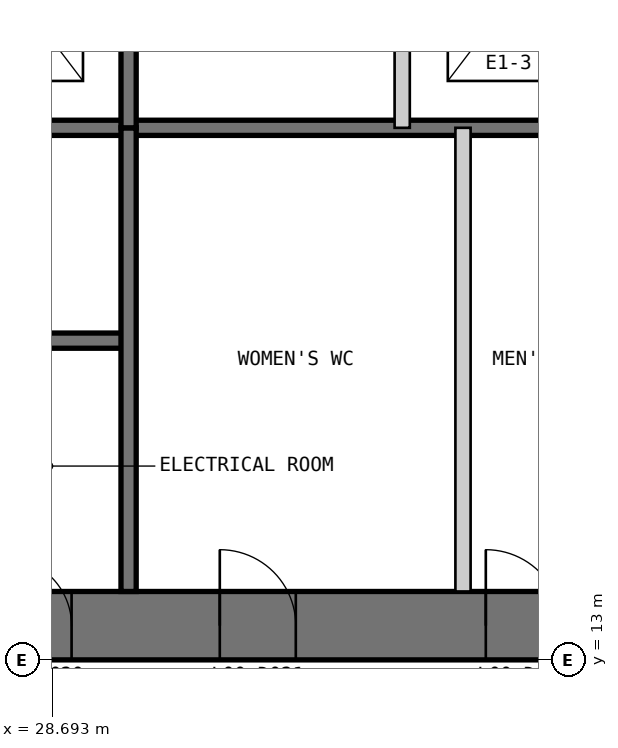
"""IFC4 building model, lengths in metres.
Left out: names, types, materials, properties, quantities, classifications, styles, units other than length and angle.
Written with IfcOpenShell. Run it as: python <this file> out.ifc"""

import sys

from ifc_helpers import new_model, si_unit, direction, frame, frame_2d, origin, place, context, subcontext, project, spatial, polyline, rectangle, outline, extrude, element, fill, save


model = new_model("IFC4")
c1 = context("Model", 3, precision=1e-05, world=origin(), true_north=direction((0.0, 1.0)))
c2 = subcontext(c1, "Body", "Model", "MODEL_VIEW")
j1 = project(units=[si_unit("LENGTHUNIT", "METRE"), si_unit("PLANEANGLEUNIT", "RADIAN")], contexts=[c1])
p1 = place(None, origin())
s1 = spatial("IfcSite", under=j1, at=p1, CompositionType="ELEMENT")
p2 = place(p1, origin())
s2 = spatial("IfcBuilding", under=s1, at=p2, CompositionType="ELEMENT")
p3 = place(p2, origin())
s3 = spatial("IfcBuildingStorey", under=s2, at=p3, CompositionType="ELEMENT", Elevation=0.0)
p4 = place(p3, frame((13.0, 13.45, 0.0), z_axis=(0.0, 0.0, 1.0), x_axis=(1.0, 0.0, 0.0)))
e1 = element("IfcWall", 1, at=p4, inside=s3, PredefinedType="SHEAR", context=c2, shape_type="SweptSolid", body=[
    extrude(outline(polyline([(0.0, -0.45), (24.0, -0.45), (23.1, 0.45), (0.9, 0.45), (0.0, -0.45)])), origin(), (0.0, 0.0, 1.0), 7.0),
])
p5 = place(p4, frame((4.9, 0.0, 0.0)))
e2 = element("IfcOpeningElement", 2, at=p5, cuts=e1, PredefinedType="OPENING", context=c2, shape_type="SweptSolid", body=[
    extrude(rectangle(XDim=1.0, YDim=2.2, at=frame_2d((0.5, 1.1))), frame((0.0, 0.46, 0.0), z_axis=(0.0, -1.0, 0.0), x_axis=(1.0, 0.0, 0.0)), (0.0, 0.0, 1.0), 0.92),
])
p6 = place(p4, frame((8.9, 0.0, 0.0)))
e3 = element("IfcOpeningElement", 3, at=p6, cuts=e1, PredefinedType="OPENING", context=c2, shape_type="SweptSolid", body=[
    extrude(rectangle(XDim=1.1, YDim=2.2, at=frame_2d((0.55, 1.1))), frame((0.0, 0.46, 0.0), z_axis=(0.0, -1.0, 0.0), x_axis=(1.0, 0.0, 0.0)), (0.0, 0.0, 1.0), 0.92),
])
p7 = place(p4, frame((15.05, 0.0, 0.0)))
e4 = element("IfcOpeningElement", 4, at=p7, cuts=e1, PredefinedType="OPENING", context=c2, shape_type="SweptSolid", body=[
    extrude(rectangle(XDim=0.9, YDim=2.2, at=frame_2d((0.45, 1.1))), frame((0.0, 0.46, 0.0), z_axis=(0.0, -1.0, 0.0), x_axis=(1.0, 0.0, 0.0)), (0.0, 0.0, 1.0), 0.92),
])
p8 = place(p4, frame((17.9, 0.0, 0.0)))
e5 = element("IfcOpeningElement", 5, at=p8, cuts=e1, PredefinedType="OPENING", context=c2, shape_type="SweptSolid", body=[
    extrude(rectangle(XDim=1.0, YDim=2.2, at=frame_2d((0.5, 1.1))), frame((0.0, 0.46, 0.0), z_axis=(0.0, -1.0, 0.0), x_axis=(1.0, 0.0, 0.0)), (0.0, 0.0, 1.0), 0.92),
])
p9 = place(p4, frame((21.4, 0.0, 0.0)))
e6 = element("IfcOpeningElement", 6, at=p9, cuts=e1, PredefinedType="OPENING", context=c2, shape_type="SweptSolid", body=[
    extrude(rectangle(XDim=1.0, YDim=2.2, at=frame_2d((0.5, 1.1))), frame((0.0, 0.46, 0.0), z_axis=(0.0, -1.0, 0.0), x_axis=(1.0, 0.0, 0.0)), (0.0, 0.0, 1.0), 0.92),
])
p10 = place(p3, frame((20.3, 17.2, 0.0), z_axis=(0.0, 0.0, 1.0), x_axis=(1.0, 0.0, 0.0)))
e7 = element("IfcWall", 7, at=p10, inside=s3, PredefinedType="SOLIDWALL", context=c2, shape_type="SweptSolid", body=[
    extrude(rectangle(XDim=9.4, YDim=0.2, at=frame_2d((4.7, 0.0))), origin(), (0.0, 0.0, 1.0), 6.8),
])
p11 = place(p10, frame((0.25, 0.0, 0.0)))
e8 = element("IfcOpeningElement", 8, at=p11, cuts=e7, PredefinedType="OPENING", context=c2, shape_type="SweptSolid", body=[
    extrude(rectangle(XDim=1.0, YDim=2.2, at=frame_2d((0.5, 1.1))), frame((0.0, 0.11, 0.0), z_axis=(0.0, -1.0, 0.0), x_axis=(1.0, 0.0, 0.0)), (0.0, 0.0, 1.0), 0.22),
])
p12 = place(p3, frame((20.3, 20.0, 0.0), z_axis=(0.0, 0.0, 1.0), x_axis=(1.0, 0.0, 0.0)))
e9 = element("IfcWall", 9, at=p12, inside=s3, PredefinedType="SOLIDWALL", context=c2, shape_type="SweptSolid", body=[
    extrude(rectangle(XDim=15.8, YDim=0.2, at=frame_2d((7.9, 0.0))), origin(), (0.0, 0.0, 1.0), 6.8),
])
p13 = place(p3, frame((29.7, 13.9, 0.0), z_axis=(0.0, 0.0, 1.0), x_axis=(0.0, 1.0, 0.0)))
e10 = element("IfcWall", 10, at=p13, inside=s3, PredefinedType="SOLIDWALL", context=c2, shape_type="SweptSolid", body=[
    extrude(rectangle(XDim=6.1, YDim=0.2, at=frame_2d((3.05, 0.0))), origin(), (0.0, 0.0, 1.0), 6.8),
])
p14 = place(p3, frame((34.1, 13.9, 0.0), z_axis=(0.0, 0.0, 1.0), x_axis=(0.0, 1.0, 0.0)))
e11 = element("IfcWall", 11, at=p14, inside=s3, PredefinedType="PARTITIONING", context=c2, shape_type="SweptSolid", body=[
    extrude(rectangle(XDim=6.1, YDim=0.2, at=frame_2d((3.05, 0.0))), origin(), (0.0, 0.0, 1.0), 6.8),
])
p15 = place(p3, frame((33.3, 36.1, 0.0), z_axis=(0.0, 0.0, 1.0), x_axis=(0.0, -1.0, 0.0)))
e12 = element("IfcWall", 12, at=p15, inside=s3, PredefinedType="PARTITIONING", context=c2, shape_type="SweptSolid", body=[
    extrude(rectangle(XDim=16.1, YDim=0.2, at=frame_2d((8.05, 0.0))), origin(), (0.0, 0.0, 1.0), 6.8),
])
p16 = place(p15, frame((4.4, 0.0, 0.0)))
e13 = element("IfcOpeningElement", 13, at=p16, cuts=e12, PredefinedType="OPENING", context=c2, shape_type="SweptSolid", body=[
    extrude(rectangle(XDim=0.9, YDim=2.2, at=frame_2d((0.45, 1.1))), frame((0.0, 0.11, 0.0), z_axis=(0.0, -1.0, 0.0), x_axis=(1.0, 0.0, 0.0)), (0.0, 0.0, 1.0), 0.22),
])
p17 = place(p15, frame((7.217, 0.0, 0.0)))
e14 = element("IfcOpeningElement", 14, at=p17, cuts=e12, PredefinedType="OPENING", context=c2, shape_type="SweptSolid", body=[
    extrude(rectangle(XDim=1.1, YDim=2.2, at=frame_2d((0.55, 1.1))), frame((0.0, 0.11, 0.0), z_axis=(0.0, -1.0, 0.0), x_axis=(1.0, 0.0, 0.0)), (0.0, 0.0, 1.0), 0.22),
])
p18 = place(p15, frame((10.55, 0.0, 0.0)))
e15 = element("IfcOpeningElement", 15, at=p18, cuts=e12, PredefinedType="OPENING", context=c2, shape_type="SweptSolid", body=[
    extrude(rectangle(XDim=1.1, YDim=2.2, at=frame_2d((0.55, 1.1))), frame((0.0, 0.11, 0.0), z_axis=(0.0, -1.0, 0.0), x_axis=(1.0, 0.0, 0.0)), (0.0, 0.0, 1.0), 0.22),
])
p19 = place(p15, frame((13.883, 0.0, 0.0)))
e16 = element("IfcOpeningElement", 16, at=p19, cuts=e12, PredefinedType="OPENING", context=c2, shape_type="SweptSolid", body=[
    extrude(rectangle(XDim=1.1, YDim=2.2, at=frame_2d((0.55, 1.1))), frame((0.0, 0.11, 0.0), z_axis=(0.0, -1.0, 0.0), x_axis=(1.0, 0.0, 0.0)), (0.0, 0.0, 1.0), 0.22),
])
p20 = place(p3, frame((29.7, 36.1, 0.0), z_axis=(0.0, 0.0, 1.0), x_axis=(0.0, -1.0, 0.0)))
e17 = element("IfcWall", 17, at=p20, inside=s3, PredefinedType="SOLIDWALL", context=c2, shape_type="SweptSolid", body=[
    extrude(rectangle(XDim=16.1, YDim=0.2, at=frame_2d((8.05, 0.0))), origin(), (0.0, 0.0, 1.0), 6.8),
])
p21 = place(p20, frame((7.217, 0.0, 0.0)))
e18 = element("IfcOpeningElement", 18, at=p21, cuts=e17, PredefinedType="OPENING", context=c2, shape_type="SweptSolid", body=[
    extrude(rectangle(XDim=1.1, YDim=2.2, at=frame_2d((0.55, 1.1))), frame((0.0, 0.11, 0.0), z_axis=(0.0, -1.0, 0.0), x_axis=(1.0, 0.0, 0.0)), (0.0, 0.0, 1.0), 0.22),
])
p22 = place(p20, frame((10.55, 0.0, 0.0)))
e19 = element("IfcOpeningElement", 19, at=p22, cuts=e17, PredefinedType="OPENING", context=c2, shape_type="SweptSolid", body=[
    extrude(rectangle(XDim=1.1, YDim=2.2, at=frame_2d((0.55, 1.1))), frame((0.0, 0.11, 0.0), z_axis=(0.0, -1.0, 0.0), x_axis=(1.0, 0.0, 0.0)), (0.0, 0.0, 1.0), 0.22),
])
p23 = place(p20, frame((13.883, 0.0, 0.0)))
e20 = element("IfcOpeningElement", 20, at=p23, cuts=e17, PredefinedType="OPENING", context=c2, shape_type="SweptSolid", body=[
    extrude(rectangle(XDim=1.1, YDim=2.2, at=frame_2d((0.55, 1.1))), frame((0.0, 0.11, 0.0), z_axis=(0.0, -1.0, 0.0), x_axis=(1.0, 0.0, 0.0)), (0.0, 0.0, 1.0), 0.22),
])
p24 = place(p7, origin())
e21 = element("IfcDoor", 21, at=p24, inside=s3, OperationType="SINGLE_SWING_LEFT", PredefinedType="DOOR", context=c2, shape_type="SweptSolid", body=[
    extrude(rectangle(XDim=0.9, YDim=2.2, at=frame_2d((0.45, 1.1))), frame((0.0, 0.025, 0.0), z_axis=(0.0, -1.0, 0.0), x_axis=(1.0, 0.0, 0.0)), (0.0, 0.0, 1.0), 0.05),
    extrude(outline(polyline([(0.0, 0.0), (0.04, 0.0), (0.04, 2.16), (0.86, 2.16), (0.86, 0.0), (0.9, 0.0), (0.9, 2.2), (0.0, 2.2), (0.0, 0.0)])), frame((0.0, 0.3, 0.0), z_axis=(0.0, -1.0, 0.0), x_axis=(1.0, 0.0, 0.0)), (0.0, 0.0, 1.0), 0.6),
])
fill(e4, e21)
p25 = place(p8, origin())
e22 = element("IfcDoor", 22, at=p25, inside=s3, OperationType="SINGLE_SWING_LEFT", PredefinedType="DOOR", context=c2, shape_type="SweptSolid", body=[
    extrude(rectangle(XDim=1.0, YDim=2.2, at=frame_2d((0.5, 1.1))), frame((0.0, 0.025, 0.0), z_axis=(0.0, -1.0, 0.0), x_axis=(1.0, 0.0, 0.0)), (0.0, 0.0, 1.0), 0.05),
    extrude(outline(polyline([(0.0, 0.0), (0.04, 0.0), (0.04, 2.16), (0.96, 2.16), (0.96, 0.0), (1.0, 0.0), (1.0, 2.2), (0.0, 2.2), (0.0, 0.0)])), frame((0.0, 0.3, 0.0), z_axis=(0.0, -1.0, 0.0), x_axis=(1.0, 0.0, 0.0)), (0.0, 0.0, 1.0), 0.6),
])
fill(e5, e22)
p26 = place(p9, origin())
e23 = element("IfcDoor", 23, at=p26, inside=s3, OperationType="SINGLE_SWING_LEFT", PredefinedType="DOOR", context=c2, shape_type="SweptSolid", body=[
    extrude(rectangle(XDim=1.0, YDim=2.2, at=frame_2d((0.5, 1.1))), frame((0.0, 0.025, 0.0), z_axis=(0.0, -1.0, 0.0), x_axis=(1.0, 0.0, 0.0)), (0.0, 0.0, 1.0), 0.05),
    extrude(outline(polyline([(0.0, 0.0), (0.04, 0.0), (0.04, 2.16), (0.96, 2.16), (0.96, 0.0), (1.0, 0.0), (1.0, 2.2), (0.0, 2.2), (0.0, 0.0)])), frame((0.0, 0.3, 0.0), z_axis=(0.0, -1.0, 0.0), x_axis=(1.0, 0.0, 0.0)), (0.0, 0.0, 1.0), 0.6),
])
fill(e6, e23)
save(model, sys.argv[1])
